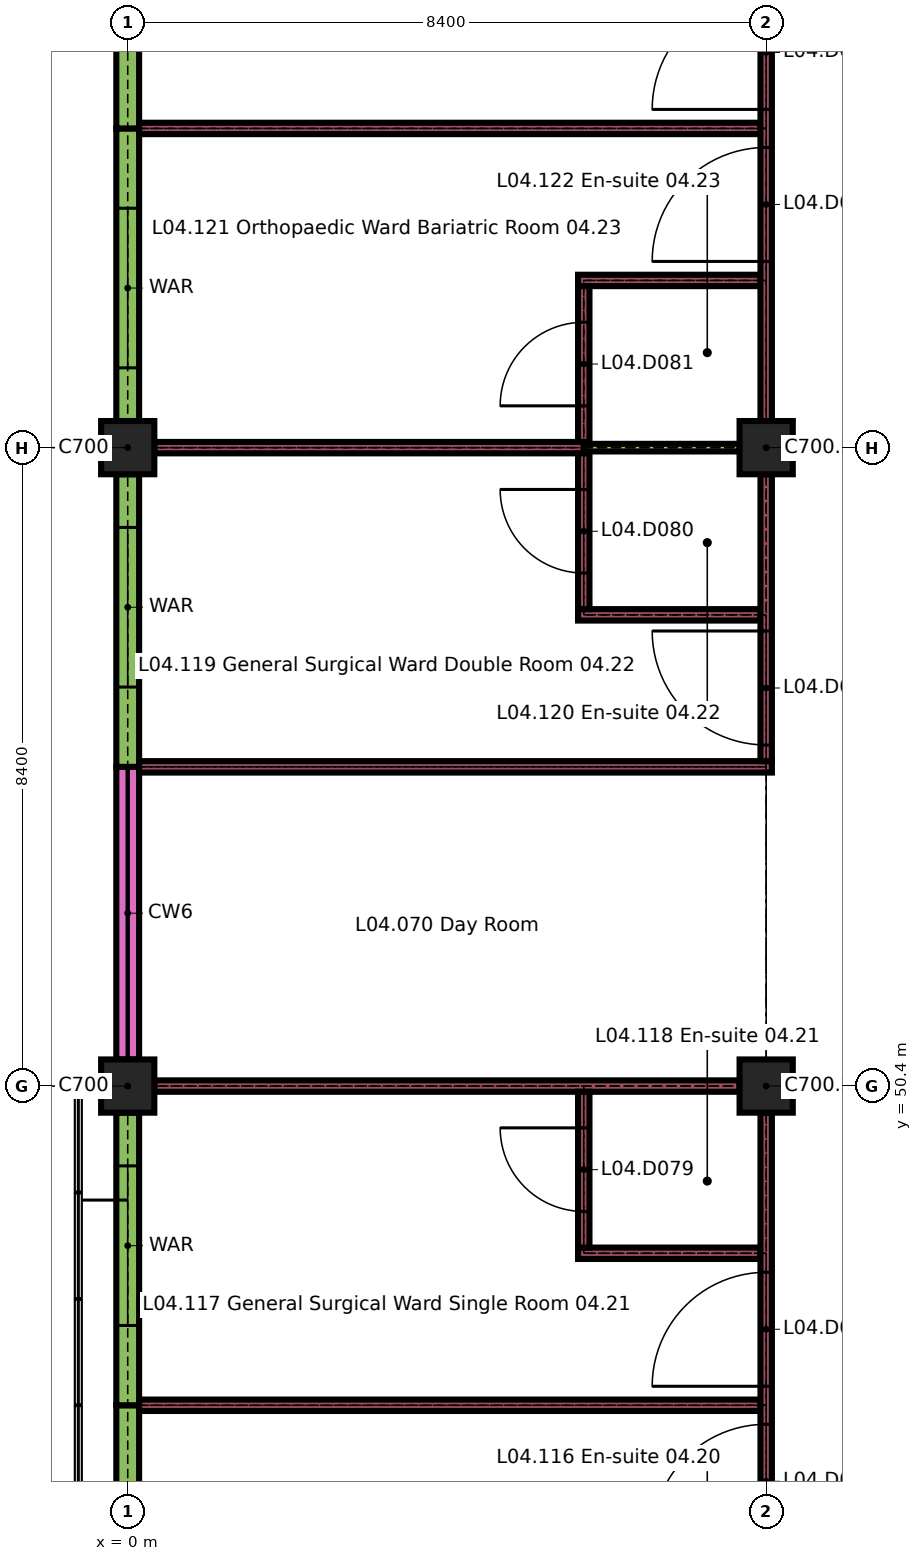
"""IFC4 building model, lengths in metres.
Left out: names, types, materials, properties, quantities, classifications, styles, units other than length and angle.
Written with IfcOpenShell. Run it as: python <this file> out.ifc"""

import sys

from ifc_helpers import new_model, si_unit, direction, frame, frame_2d, origin, origin_2d, place, context, subcontext, project, spatial, rectangle, extrude, element, fill, save


model = new_model("IFC4")
c1 = context("Model", 3, precision=1e-05, world=origin(), true_north=direction((0.0, 1.0)))
c2 = subcontext(c1, "Body", "Model", "MODEL_VIEW")
j1 = project(units=[si_unit("LENGTHUNIT", "METRE"), si_unit("PLANEANGLEUNIT", "RADIAN")], contexts=[c1])
p1 = place(None, origin())
s1 = spatial("IfcSite", under=j1, at=p1, CompositionType="ELEMENT")
p2 = place(p1, origin())
s2 = spatial("IfcBuilding", under=s1, at=p2, CompositionType="ELEMENT")
p3 = place(p2, frame((0.0, 0.0, 18.9)))
s3 = spatial("IfcBuildingStorey", under=s2, at=p3, CompositionType="ELEMENT", Elevation=18.9)
for number, where, z_axis, x_axis in (
    (1, (0.0, 50.4, 0.0), (0.0, 0.0, 1.0), (1.0, 0.0, 0.0)),
    (2, (8.4, 50.4, 0.0), (0.0, 0.0, 1.0), (1.0, 0.0, 0.0)),
    (3, (0.0, 58.8, 0.0), (0.0, 0.0, 1.0), (1.0, 0.0, 0.0)),
    (4, (8.4, 58.8, 0.0), (0.0, 0.0, 1.0), (1.0, 0.0, 0.0)),
):
    element("IfcColumn", number, at=place(p3, frame(where, z_axis=z_axis, x_axis=x_axis)), inside=s3, PredefinedType="COLUMN", context=c2, shape_type="SweptSolid", body=[
        extrude(rectangle(XDim=0.7, YDim=0.7, at=origin_2d()), origin(), (0.0, 0.0, 1.0), 3.26),
    ])
p4 = place(p3, frame((0.0, 42.35, 0.0), z_axis=(0.0, 0.0, 1.0), x_axis=(0.0, 1.0, 0.0)))
e5 = element("IfcWall", 5, at=p4, inside=s3, PredefinedType="SOLIDWALL", context=c2, shape_type="SweptSolid", body=[
    extrude(rectangle(XDim=3.85, YDim=0.3, at=frame_2d((1.925, 0.0))), origin(), (0.0, 0.0, 1.0), 2.96),
])
p5 = place(p4, frame((0.7, 0.0, 0.9)))
e6 = element("IfcOpeningElement", 6, at=p5, cuts=e5, PredefinedType="OPENING", context=c2, shape_type="SweptSolid", body=[
    extrude(rectangle(XDim=2.1, YDim=1.5, at=frame_2d((1.05, 0.75))), frame((0.0, 0.16, 0.0), z_axis=(0.0, -1.0, 0.0), x_axis=(1.0, 0.0, 0.0)), (0.0, 0.0, 1.0), 0.32),
])
p6 = place(p3, frame((0.0, 46.2, 0.0), z_axis=(0.0, 0.0, 1.0), x_axis=(0.0, 1.0, 0.0)))
e7 = element("IfcWall", 7, at=p6, inside=s3, PredefinedType="SOLIDWALL", context=c2, shape_type="SweptSolid", body=[
    extrude(rectangle(XDim=3.85, YDim=0.3, at=frame_2d((1.925, 0.0))), origin(), (0.0, 0.0, 1.0), 2.96),
])
p7 = place(p6, frame((1.05, 0.0, 0.9)))
e8 = element("IfcOpeningElement", 8, at=p7, cuts=e7, PredefinedType="OPENING", context=c2, shape_type="SweptSolid", body=[
    extrude(rectangle(XDim=2.1, YDim=1.5, at=frame_2d((1.05, 0.75))), frame((0.0, 0.16, 0.0), z_axis=(0.0, -1.0, 0.0), x_axis=(1.0, 0.0, 0.0)), (0.0, 0.0, 1.0), 0.32),
])
p8 = place(p3, frame((0.0, 50.75, 0.0), z_axis=(0.0, 0.0, 1.0), x_axis=(0.0, 1.0, 0.0)))
e9 = element("IfcWall", 9, at=p8, inside=s3, PredefinedType="SOLIDWALL", context=c2, shape_type="SweptSolid", body=[
    extrude(rectangle(XDim=3.85, YDim=0.3, at=frame_2d((1.925, 0.0))), origin(), (0.0, 0.0, 1.0), 0.6),
])
p9 = place(p3, frame((0.0, 54.6, 0.0), z_axis=(0.0, 0.0, 1.0), x_axis=(0.0, 1.0, 0.0)))
e10 = element("IfcWall", 10, at=p9, inside=s3, PredefinedType="SOLIDWALL", context=c2, shape_type="SweptSolid", body=[
    extrude(rectangle(XDim=3.85, YDim=0.3, at=frame_2d((1.925, 0.0))), origin(), (0.0, 0.0, 1.0), 2.96),
])
p10 = place(p9, frame((1.05, 0.0, 0.9)))
e11 = element("IfcOpeningElement", 11, at=p10, cuts=e10, PredefinedType="OPENING", context=c2, shape_type="SweptSolid", body=[
    extrude(rectangle(XDim=2.1, YDim=1.5, at=frame_2d((1.05, 0.75))), frame((0.0, 0.16, 0.0), z_axis=(0.0, -1.0, 0.0), x_axis=(1.0, 0.0, 0.0)), (0.0, 0.0, 1.0), 0.32),
])
p11 = place(p3, frame((0.0, 59.15, 0.0), z_axis=(0.0, 0.0, 1.0), x_axis=(0.0, 1.0, 0.0)))
e12 = element("IfcWall", 12, at=p11, inside=s3, PredefinedType="SOLIDWALL", context=c2, shape_type="SweptSolid", body=[
    extrude(rectangle(XDim=3.85, YDim=0.3, at=frame_2d((1.925, 0.0))), origin(), (0.0, 0.0, 1.0), 2.96),
])
p12 = place(p11, frame((0.7, 0.0, 0.9)))
e13 = element("IfcOpeningElement", 13, at=p12, cuts=e12, PredefinedType="OPENING", context=c2, shape_type="SweptSolid", body=[
    extrude(rectangle(XDim=2.1, YDim=1.5, at=frame_2d((1.05, 0.75))), frame((0.0, 0.16, 0.0), z_axis=(0.0, -1.0, 0.0), x_axis=(1.0, 0.0, 0.0)), (0.0, 0.0, 1.0), 0.32),
])
p13 = place(p3, frame((0.0, 63.0, 0.0), z_axis=(0.0, 0.0, 1.0), x_axis=(0.0, 1.0, 0.0)))
e14 = element("IfcWall", 14, at=p13, inside=s3, PredefinedType="SOLIDWALL", context=c2, shape_type="SweptSolid", body=[
    extrude(rectangle(XDim=4.2, YDim=0.3, at=frame_2d((2.1, 0.0))), origin(), (0.0, 0.0, 1.0), 2.96),
])
p14 = place(p13, frame((1.05, 0.0, 0.9)))
e15 = element("IfcOpeningElement", 15, at=p14, cuts=e14, PredefinedType="OPENING", context=c2, shape_type="SweptSolid", body=[
    extrude(rectangle(XDim=2.1, YDim=1.5, at=frame_2d((1.05, 0.75))), frame((0.0, 0.16, 0.0), z_axis=(0.0, -1.0, 0.0), x_axis=(1.0, 0.0, 0.0)), (0.0, 0.0, 1.0), 0.32),
])
p15 = place(p3, frame((0.15, 46.2, 0.0), z_axis=(0.0, 0.0, 1.0), x_axis=(1.0, 0.0, 0.0)))
e16 = element("IfcWall", 16, at=p15, inside=s3, PredefinedType="PARTITIONING", context=c2, shape_type="SweptSolid", body=[
    extrude(rectangle(XDim=8.175, YDim=0.15, at=frame_2d((4.087, 0.0))), origin(), (0.0, 0.0, 1.0), 3.26),
])
p16 = place(p3, frame((5.925, 48.2, 0.0), z_axis=(0.0, 0.0, 1.0), x_axis=(1.0, 0.0, 0.0)))
e17 = element("IfcWall", 17, at=p16, inside=s3, PredefinedType="PARTITIONING", context=c2, shape_type="SweptSolid", body=[
    extrude(rectangle(XDim=2.4, YDim=0.15, at=frame_2d((1.2, 0.0))), origin(), (0.0, 0.0, 1.0), 3.26),
])
p17 = place(p3, frame((0.35, 50.4, 0.0), z_axis=(0.0, 0.0, 1.0), x_axis=(1.0, 0.0, 0.0)))
e18 = element("IfcWall", 18, at=p17, inside=s3, PredefinedType="PARTITIONING", context=c2, shape_type="SweptSolid", body=[
    extrude(rectangle(XDim=7.7, YDim=0.15, at=frame_2d((3.85, 0.0))), origin(), (0.0, 0.0, 1.0), 3.26),
])
p18 = place(p3, frame((0.15, 54.6, 0.0), z_axis=(0.0, 0.0, 1.0), x_axis=(1.0, 0.0, 0.0)))
e19 = element("IfcWall", 19, at=p18, inside=s3, PredefinedType="PARTITIONING", context=c2, shape_type="SweptSolid", body=[
    extrude(rectangle(XDim=8.325, YDim=0.15, at=frame_2d((4.163, 0.0))), origin(), (0.0, 0.0, 1.0), 3.26),
])
p19 = place(p3, frame((5.925, 56.6, 0.0), z_axis=(0.0, 0.0, 1.0), x_axis=(1.0, 0.0, 0.0)))
e20 = element("IfcWall", 20, at=p19, inside=s3, PredefinedType="PARTITIONING", context=c2, shape_type="SweptSolid", body=[
    extrude(rectangle(XDim=2.4, YDim=0.15, at=frame_2d((1.2, 0.0))), origin(), (0.0, 0.0, 1.0), 3.26),
])
p20 = place(p3, frame((0.35, 58.8, 0.0), z_axis=(0.0, 0.0, 1.0), x_axis=(1.0, 0.0, 0.0)))
e21 = element("IfcWall", 21, at=p20, inside=s3, PredefinedType="PARTITIONING", context=c2, shape_type="SweptSolid", body=[
    extrude(rectangle(XDim=5.65, YDim=0.15, at=frame_2d((2.825, 0.0))), origin(), (0.0, 0.0, 1.0), 3.26),
])
p21 = place(p3, frame((6.0, 58.8, 0.0), z_axis=(0.0, 0.0, 1.0), x_axis=(1.0, 0.0, 0.0)))
e22 = element("IfcWall", 22, at=p21, inside=s3, PredefinedType="PARTITIONING", context=c2, shape_type="SweptSolid", body=[
    extrude(rectangle(XDim=2.05, YDim=0.1, at=frame_2d((1.025, 0.0))), origin(), (0.0, 0.0, 1.0), 3.26),
])
p22 = place(p3, frame((5.925, 61.0, 0.0), z_axis=(0.0, 0.0, 1.0), x_axis=(1.0, 0.0, 0.0)))
e23 = element("IfcWall", 23, at=p22, inside=s3, PredefinedType="PARTITIONING", context=c2, shape_type="SweptSolid", body=[
    extrude(rectangle(XDim=2.4, YDim=0.15, at=frame_2d((1.2, 0.0))), origin(), (0.0, 0.0, 1.0), 3.26),
])
p23 = place(p3, frame((0.15, 63.0, 0.0), z_axis=(0.0, 0.0, 1.0), x_axis=(1.0, 0.0, 0.0)))
e24 = element("IfcWall", 24, at=p23, inside=s3, PredefinedType="PARTITIONING", context=c2, shape_type="SweptSolid", body=[
    extrude(rectangle(XDim=8.175, YDim=0.15, at=frame_2d((4.087, 0.0))), origin(), (0.0, 0.0, 1.0), 3.26),
])
p24 = place(p3, frame((6.0, 48.275, 0.0), z_axis=(0.0, 0.0, 1.0), x_axis=(0.0, 1.0, 0.0)))
e25 = element("IfcWall", 25, at=p24, inside=s3, PredefinedType="PARTITIONING", context=c2, shape_type="SweptSolid", body=[
    extrude(rectangle(XDim=2.05, YDim=0.15, at=frame_2d((1.025, 0.0))), origin(), (0.0, 0.0, 1.0), 3.26),
])
p25 = place(p24, frame((0.475, 0.0, 0.0)))
e26 = element("IfcOpeningElement", 26, at=p25, cuts=e25, PredefinedType="OPENING", context=c2, shape_type="SweptSolid", body=[
    extrude(rectangle(XDim=1.1, YDim=2.1, at=frame_2d((0.55, 1.05))), frame((0.0, 0.085, 0.0), z_axis=(0.0, -1.0, 0.0), x_axis=(1.0, 0.0, 0.0)), (0.0, 0.0, 1.0), 0.17),
])
p26 = place(p3, frame((6.0, 56.675, 0.0), z_axis=(0.0, 0.0, 1.0), x_axis=(0.0, 1.0, 0.0)))
e27 = element("IfcWall", 27, at=p26, inside=s3, PredefinedType="PARTITIONING", context=c2, shape_type="SweptSolid", body=[
    extrude(rectangle(XDim=2.05, YDim=0.15, at=frame_2d((1.025, 0.0))), origin(), (0.0, 0.0, 1.0), 3.26),
])
p27 = place(p26, frame((0.475, 0.0, 0.0)))
e28 = element("IfcOpeningElement", 28, at=p27, cuts=e27, PredefinedType="OPENING", context=c2, shape_type="SweptSolid", body=[
    extrude(rectangle(XDim=1.1, YDim=2.1, at=frame_2d((0.55, 1.05))), frame((0.0, 0.085, 0.0), z_axis=(0.0, -1.0, 0.0), x_axis=(1.0, 0.0, 0.0)), (0.0, 0.0, 1.0), 0.17),
])
p28 = place(p3, frame((6.0, 58.875, 0.0), z_axis=(0.0, 0.0, 1.0), x_axis=(0.0, 1.0, 0.0)))
e29 = element("IfcWall", 29, at=p28, inside=s3, PredefinedType="PARTITIONING", context=c2, shape_type="SweptSolid", body=[
    extrude(rectangle(XDim=2.05, YDim=0.15, at=frame_2d((1.025, 0.0))), origin(), (0.0, 0.0, 1.0), 3.26),
])
p29 = place(p28, frame((0.475, 0.0, 0.0)))
e30 = element("IfcOpeningElement", 30, at=p29, cuts=e29, PredefinedType="OPENING", context=c2, shape_type="SweptSolid", body=[
    extrude(rectangle(XDim=1.1, YDim=2.1, at=frame_2d((0.55, 1.05))), frame((0.0, 0.085, 0.0), z_axis=(0.0, -1.0, 0.0), x_axis=(1.0, 0.0, 0.0)), (0.0, 0.0, 1.0), 0.17),
])
p30 = place(p3, frame((8.4, 42.35, 0.0), z_axis=(0.0, 0.0, 1.0), x_axis=(0.0, 1.0, 0.0)))
e31 = element("IfcWall", 31, at=p30, inside=s3, PredefinedType="PARTITIONING", context=c2, shape_type="SweptSolid", body=[
    extrude(rectangle(XDim=7.7, YDim=0.15, at=frame_2d((3.85, 0.0))), origin(), (0.0, 0.0, 1.0), 3.26),
])
p31 = place(p30, frame((2.1, 0.0, 0.0)))
e32 = element("IfcOpeningElement", 32, at=p31, cuts=e31, PredefinedType="OPENING", context=c2, shape_type="SweptSolid", body=[
    extrude(rectangle(XDim=1.5, YDim=2.4, at=frame_2d((0.75, 1.2))), frame((0.0, 0.085, 0.0), z_axis=(0.0, -1.0, 0.0), x_axis=(1.0, 0.0, 0.0)), (0.0, 0.0, 1.0), 0.17),
])
p32 = place(p30, frame((4.1, 0.0, 0.0)))
e33 = element("IfcOpeningElement", 33, at=p32, cuts=e31, PredefinedType="OPENING", context=c2, shape_type="SweptSolid", body=[
    extrude(rectangle(XDim=1.5, YDim=2.4, at=frame_2d((0.75, 1.2))), frame((0.0, 0.085, 0.0), z_axis=(0.0, -1.0, 0.0), x_axis=(1.0, 0.0, 0.0)), (0.0, 0.0, 1.0), 0.17),
])
p33 = place(p3, frame((8.4, 54.675, 0.0), z_axis=(0.0, 0.0, 1.0), x_axis=(0.0, 1.0, 0.0)))
e34 = element("IfcWall", 34, at=p33, inside=s3, PredefinedType="PARTITIONING", context=c2, shape_type="SweptSolid", body=[
    extrude(rectangle(XDim=3.775, YDim=0.15, at=frame_2d((1.887, 0.0))), origin(), (0.0, 0.0, 1.0), 3.26),
])
p34 = place(p33, frame((0.212, 0.0, 0.0)))
e35 = element("IfcOpeningElement", 35, at=p34, cuts=e34, PredefinedType="OPENING", context=c2, shape_type="SweptSolid", body=[
    extrude(rectangle(XDim=1.5, YDim=2.4, at=frame_2d((0.75, 1.2))), frame((0.0, 0.085, 0.0), z_axis=(0.0, -1.0, 0.0), x_axis=(1.0, 0.0, 0.0)), (0.0, 0.0, 1.0), 0.17),
])
p35 = place(p3, frame((8.4, 59.15, 0.0), z_axis=(0.0, 0.0, 1.0), x_axis=(0.0, 1.0, 0.0)))
e36 = element("IfcWall", 36, at=p35, inside=s3, PredefinedType="PARTITIONING", context=c2, shape_type="SweptSolid", body=[
    extrude(rectangle(XDim=8.05, YDim=0.15, at=frame_2d((4.025, 0.0))), origin(), (0.0, 0.0, 1.0), 3.26),
])
p36 = place(p35, frame((2.1, 0.0, 0.0)))
e37 = element("IfcOpeningElement", 37, at=p36, cuts=e36, PredefinedType="OPENING", context=c2, shape_type="SweptSolid", body=[
    extrude(rectangle(XDim=1.5, YDim=2.4, at=frame_2d((0.75, 1.2))), frame((0.0, 0.085, 0.0), z_axis=(0.0, -1.0, 0.0), x_axis=(1.0, 0.0, 0.0)), (0.0, 0.0, 1.0), 0.17),
])
p37 = place(p35, frame((4.1, 0.0, 0.0)))
e38 = element("IfcOpeningElement", 38, at=p37, cuts=e36, PredefinedType="OPENING", context=c2, shape_type="SweptSolid", body=[
    extrude(rectangle(XDim=1.5, YDim=2.4, at=frame_2d((0.75, 1.2))), frame((0.0, 0.085, 0.0), z_axis=(0.0, -1.0, 0.0), x_axis=(1.0, 0.0, 0.0)), (0.0, 0.0, 1.0), 0.17),
])
p38 = place(p7, origin())
e39 = element("IfcWindow", 39, at=p38, inside=s3, PartitioningType="DOUBLE_PANEL_VERTICAL", PredefinedType="WINDOW", context=c2, shape_type="SweptSolid", body=[
    extrude(rectangle(XDim=2.1, YDim=1.5, at=frame_2d((1.05, 0.75))), frame((0.0, 0.05, 0.0), z_axis=(0.0, -1.0, 0.0), x_axis=(1.0, 0.0, 0.0)), (0.0, 0.0, 1.0), 0.1),
])
fill(e8, e39)
p39 = place(p10, origin())
e40 = element("IfcWindow", 40, at=p39, inside=s3, PartitioningType="DOUBLE_PANEL_VERTICAL", PredefinedType="WINDOW", context=c2, shape_type="SweptSolid", body=[
    extrude(rectangle(XDim=2.1, YDim=1.5, at=frame_2d((1.05, 0.75))), frame((0.0, 0.05, 0.0), z_axis=(0.0, -1.0, 0.0), x_axis=(1.0, 0.0, 0.0)), (0.0, 0.0, 1.0), 0.1),
])
fill(e11, e40)
p40 = place(p12, origin())
e41 = element("IfcWindow", 41, at=p40, inside=s3, PartitioningType="DOUBLE_PANEL_VERTICAL", PredefinedType="WINDOW", context=c2, shape_type="SweptSolid", body=[
    extrude(rectangle(XDim=2.1, YDim=1.5, at=frame_2d((1.05, 0.75))), frame((0.0, 0.05, 0.0), z_axis=(0.0, -1.0, 0.0), x_axis=(1.0, 0.0, 0.0)), (0.0, 0.0, 1.0), 0.1),
])
fill(e13, e41)
p41 = place(p25, origin())
e42 = element("IfcDoor", 42, at=p41, inside=s3, OperationType="SINGLE_SWING_LEFT", PredefinedType="DOOR", context=c2, shape_type="SweptSolid", body=[
    extrude(rectangle(XDim=1.1, YDim=2.1, at=frame_2d((0.55, 1.05))), frame((0.0, 0.025, 0.0), z_axis=(0.0, -1.0, 0.0), x_axis=(1.0, 0.0, 0.0)), (0.0, 0.0, 1.0), 0.05),
])
fill(e26, e42)
p42 = place(p27, origin())
e43 = element("IfcDoor", 43, at=p42, inside=s3, OperationType="SINGLE_SWING_LEFT", PredefinedType="DOOR", context=c2, shape_type="SweptSolid", body=[
    extrude(rectangle(XDim=1.1, YDim=2.1, at=frame_2d((0.55, 1.05))), frame((0.0, 0.025, 0.0), z_axis=(0.0, -1.0, 0.0), x_axis=(1.0, 0.0, 0.0)), (0.0, 0.0, 1.0), 0.05),
])
fill(e28, e43)
p43 = place(p29, origin())
e44 = element("IfcDoor", 44, at=p43, inside=s3, OperationType="SINGLE_SWING_RIGHT", PredefinedType="DOOR", context=c2, shape_type="SweptSolid", body=[
    extrude(rectangle(XDim=1.1, YDim=2.1, at=frame_2d((0.55, 1.05))), frame((0.0, 0.025, 0.0), z_axis=(0.0, -1.0, 0.0), x_axis=(1.0, 0.0, 0.0)), (0.0, 0.0, 1.0), 0.05),
])
fill(e30, e44)
p44 = place(p31, origin())
e45 = element("IfcDoor", 45, at=p44, inside=s3, OperationType="SINGLE_SWING_RIGHT", PredefinedType="DOOR", context=c2, shape_type="SweptSolid", body=[
    extrude(rectangle(XDim=1.5, YDim=2.4, at=frame_2d((0.75, 1.2))), frame((0.0, 0.03, 0.0), z_axis=(0.0, -1.0, 0.0), x_axis=(1.0, 0.0, 0.0)), (0.0, 0.0, 1.0), 0.06),
])
fill(e32, e45)
p45 = place(p32, origin())
e46 = element("IfcDoor", 46, at=p45, inside=s3, OperationType="SINGLE_SWING_RIGHT", PredefinedType="DOOR", context=c2, shape_type="SweptSolid", body=[
    extrude(rectangle(XDim=1.5, YDim=2.4, at=frame_2d((0.75, 1.2))), frame((0.0, 0.03, 0.0), z_axis=(0.0, -1.0, 0.0), x_axis=(1.0, 0.0, 0.0)), (0.0, 0.0, 1.0), 0.06),
])
fill(e33, e46)
p46 = place(p34, origin())
e47 = element("IfcDoor", 47, at=p46, inside=s3, OperationType="SINGLE_SWING_LEFT", PredefinedType="DOOR", context=c2, shape_type="SweptSolid", body=[
    extrude(rectangle(XDim=1.5, YDim=2.4, at=frame_2d((0.75, 1.2))), frame((0.0, 0.03, 0.0), z_axis=(0.0, -1.0, 0.0), x_axis=(1.0, 0.0, 0.0)), (0.0, 0.0, 1.0), 0.06),
])
fill(e35, e47)
p47 = place(p36, origin())
e48 = element("IfcDoor", 48, at=p47, inside=s3, OperationType="SINGLE_SWING_RIGHT", PredefinedType="DOOR", context=c2, shape_type="SweptSolid", body=[
    extrude(rectangle(XDim=1.5, YDim=2.4, at=frame_2d((0.75, 1.2))), frame((0.0, 0.03, 0.0), z_axis=(0.0, -1.0, 0.0), x_axis=(1.0, 0.0, 0.0)), (0.0, 0.0, 1.0), 0.06),
])
fill(e37, e48)
p48 = place(p37, origin())
e49 = element("IfcDoor", 49, at=p48, inside=s3, OperationType="SINGLE_SWING_RIGHT", PredefinedType="DOOR", context=c2, shape_type="SweptSolid", body=[
    extrude(rectangle(XDim=1.5, YDim=2.4, at=frame_2d((0.75, 1.2))), frame((0.0, 0.03, 0.0), z_axis=(0.0, -1.0, 0.0), x_axis=(1.0, 0.0, 0.0)), (0.0, 0.0, 1.0), 0.06),
])
fill(e38, e49)
save(model, sys.argv[1])
